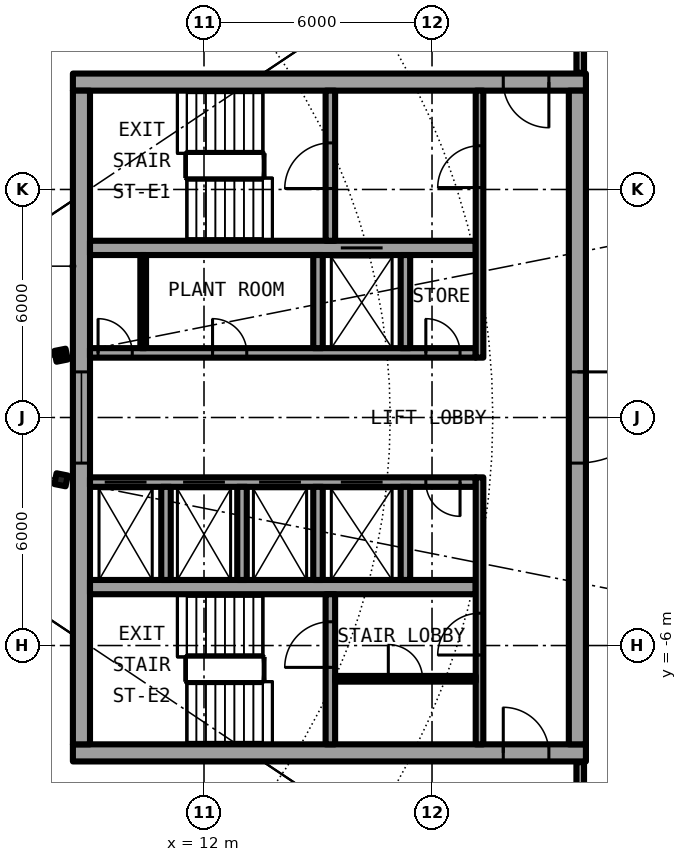
"""IFC4 building model, lengths in metres.
Left out: names, types, materials, properties, quantities, classifications, styles, units other than length and angle.
Written with IfcOpenShell. Run it as: python <this file> out.ifc"""

import sys

from ifc_helpers import new_model, si_unit, direction, frame, frame_2d, origin, origin_2d, place, context, subcontext, project, spatial, rectangle, i_section, extrude, element, fill, save


model = new_model("IFC4")
c1 = context("Model", 3, precision=1e-05, world=origin(), true_north=direction((0.0, 1.0)))
c2 = subcontext(c1, "Body", "Model", "MODEL_VIEW")
j1 = project(units=[si_unit("LENGTHUNIT", "METRE"), si_unit("PLANEANGLEUNIT", "RADIAN")], contexts=[c1])
p1 = place(None, origin())
s1 = spatial("IfcSite", under=j1, at=p1, CompositionType="ELEMENT")
p2 = place(p1, origin())
s2 = spatial("IfcBuilding", under=s1, at=p2, CompositionType="ELEMENT")
p3 = place(p2, frame((0.0, 0.0, 221.85)))
s3 = spatial("IfcBuildingStorey", under=s2, at=p3, CompositionType="ELEMENT", Elevation=221.85)
for number, where, z_axis, x_axis in (
    (1, (8.239, 1.639, 0.0), (0.0, 0.0, 1.0), (0.981, 0.195, 0.0)),
    (2, (8.239, -1.639, 0.0), (0.0, 0.0, 1.0), (0.981, -0.195, 0.0)),
):
    element("IfcColumn", number, at=place(p3, frame(where, z_axis=z_axis, x_axis=x_axis)), inside=s3, PredefinedType="COLUMN", context=c2, shape_type="SweptSolid", body=[
        extrude(i_section(OverallWidth=0.3, OverallDepth=0.29, WebThickness=0.009, FlangeThickness=0.014, FilletRadius=0.027, at=origin_2d()), origin(), (0.0, 0.0, 1.0), 6.1),
    ])
p4 = place(p3, frame((22.05, 8.825, 0.0), z_axis=(0.0, 0.0, 1.0), x_axis=(-1.0, 0.0, 0.0)))
e3 = element("IfcWall", 3, at=p4, inside=s3, PredefinedType="SHEAR", context=c2, shape_type="SweptSolid", body=[
    extrude(rectangle(XDim=13.5, YDim=0.45, at=frame_2d((6.75, 0.0))), origin(), (0.0, 0.0, 1.0), 6.1),
])
p5 = place(p4, frame((0.975, 0.0, 0.0)))
e4 = element("IfcOpeningElement", 4, at=p5, cuts=e3, PredefinedType="OPENING", context=c2, shape_type="SweptSolid", body=[
    extrude(rectangle(XDim=1.2, YDim=2.3, at=frame_2d((0.6, 1.15))), frame((0.0, 0.235, 0.0), z_axis=(0.0, -1.0, 0.0), x_axis=(1.0, 0.0, 0.0)), (0.0, 0.0, 1.0), 0.47),
])
p6 = place(p3, frame((8.55, -8.825, 0.0), z_axis=(0.0, 0.0, 1.0), x_axis=(1.0, 0.0, 0.0)))
e5 = element("IfcWall", 5, at=p6, inside=s3, PredefinedType="SHEAR", context=c2, shape_type="SweptSolid", body=[
    extrude(rectangle(XDim=13.5, YDim=0.45, at=frame_2d((6.75, 0.0))), origin(), (0.0, 0.0, 1.0), 6.1),
])
p7 = place(p6, frame((11.325, 0.0, 0.0)))
e6 = element("IfcOpeningElement", 6, at=p7, cuts=e5, PredefinedType="OPENING", context=c2, shape_type="SweptSolid", body=[
    extrude(rectangle(XDim=1.2, YDim=2.3, at=frame_2d((0.6, 1.15))), frame((0.0, 0.235, 0.0), z_axis=(0.0, -1.0, 0.0), x_axis=(1.0, 0.0, 0.0)), (0.0, 0.0, 1.0), 0.47),
])
p8 = place(p3, frame((21.825, 8.6, 0.0), z_axis=(0.0, 0.0, 1.0), x_axis=(0.0, -1.0, 0.0)))
e7 = element("IfcWall", 7, at=p8, inside=s3, PredefinedType="SHEAR", context=c2, shape_type="SweptSolid", body=[
    extrude(rectangle(XDim=17.2, YDim=0.45, at=frame_2d((8.6, 0.0))), origin(), (0.0, 0.0, 1.0), 6.1),
])
p9 = place(p8, frame((7.4, 0.0, 0.0)))
e8 = element("IfcOpeningElement", 8, at=p9, cuts=e7, PredefinedType="OPENING", context=c2, shape_type="SweptSolid", body=[
    extrude(rectangle(XDim=2.4, YDim=2.3, at=frame_2d((1.2, 1.15))), frame((0.0, 0.235, 0.0), z_axis=(0.0, -1.0, 0.0), x_axis=(1.0, 0.0, 0.0)), (0.0, 0.0, 1.0), 0.47),
])
p10 = place(p3, frame((8.775, -8.6, 0.0), z_axis=(0.0, 0.0, 1.0), x_axis=(0.0, 1.0, 0.0)))
e9 = element("IfcWall", 9, at=p10, inside=s3, PredefinedType="SHEAR", context=c2, shape_type="SweptSolid", body=[
    extrude(rectangle(XDim=17.2, YDim=0.45, at=frame_2d((8.6, 0.0))), origin(), (0.0, 0.0, 1.0), 6.1),
])
p11 = place(p10, frame((7.4, 0.0, 0.1)))
e10 = element("IfcOpeningElement", 10, at=p11, cuts=e9, PredefinedType="OPENING", context=c2, shape_type="SweptSolid", body=[
    extrude(rectangle(XDim=2.4, YDim=2.2, at=frame_2d((1.2, 1.1))), frame((0.0, 0.235, 0.0), z_axis=(0.0, -1.0, 0.0), x_axis=(1.0, 0.0, 0.0)), (0.0, 0.0, 1.0), 0.47),
])
p12 = place(p3, frame((9.0, 1.7, 0.0), z_axis=(0.0, 0.0, 1.0), x_axis=(1.0, 0.0, 0.0)))
e11 = element("IfcWall", 11, at=p12, inside=s3, PredefinedType="SHEAR", context=c2, shape_type="SweptSolid", body=[
    extrude(rectangle(XDim=10.15, YDim=0.25, at=frame_2d((5.075, 0.0))), origin(), (0.0, 0.0, 1.0), 6.1),
])
p13 = place(p12, frame((0.212, 0.0, 0.0)))
e12 = element("IfcOpeningElement", 12, at=p13, cuts=e11, PredefinedType="OPENING", context=c2, shape_type="SweptSolid", body=[
    extrude(rectangle(XDim=0.9, YDim=2.3, at=frame_2d((0.45, 1.15))), frame((0.0, 0.135, 0.0), z_axis=(0.0, -1.0, 0.0), x_axis=(1.0, 0.0, 0.0)), (0.0, 0.0, 1.0), 0.27),
])
p14 = place(p12, frame((3.225, 0.0, 0.0)))
e13 = element("IfcOpeningElement", 13, at=p14, cuts=e11, PredefinedType="OPENING", context=c2, shape_type="SweptSolid", body=[
    extrude(rectangle(XDim=0.9, YDim=2.3, at=frame_2d((0.45, 1.15))), frame((0.0, 0.135, 0.0), z_axis=(0.0, -1.0, 0.0), x_axis=(1.0, 0.0, 0.0)), (0.0, 0.0, 1.0), 0.27),
])
p15 = place(p12, frame((8.837, 0.0, 0.0)))
e14 = element("IfcOpeningElement", 14, at=p15, cuts=e11, PredefinedType="OPENING", context=c2, shape_type="SweptSolid", body=[
    extrude(rectangle(XDim=0.9, YDim=2.3, at=frame_2d((0.45, 1.15))), frame((0.0, 0.135, 0.0), z_axis=(0.0, -1.0, 0.0), x_axis=(1.0, 0.0, 0.0)), (0.0, 0.0, 1.0), 0.27),
])
p16 = place(p3, frame((9.0, 4.462, 0.0), z_axis=(0.0, 0.0, 1.0), x_axis=(1.0, 0.0, 0.0)))
e15 = element("IfcWall", 15, at=p16, inside=s3, PredefinedType="SHEAR", context=c2, shape_type="SweptSolid", body=[
    extrude(rectangle(XDim=10.15, YDim=0.375, at=frame_2d((5.075, 0.0))), origin(), (0.0, 0.0, 1.0), 6.1),
])
p17 = place(p16, frame((6.6, 0.0, 0.0)))
e16 = element("IfcOpeningElement", 16, at=p17, cuts=e15, PredefinedType="OPENING", context=c2, shape_type="SweptSolid", body=[
    extrude(rectangle(XDim=1.1, YDim=2.3, at=frame_2d((0.55, 1.15))), frame((0.0, 0.198, 0.0), z_axis=(0.0, -1.0, 0.0), x_axis=(1.0, 0.0, 0.0)), (0.0, 0.0, 1.0), 0.395),
])
p18 = place(p3, frame((15.325, 4.65, 0.0), z_axis=(0.0, 0.0, 1.0), x_axis=(0.0, 1.0, 0.0)))
e17 = element("IfcWall", 17, at=p18, inside=s3, PredefinedType="SHEAR", context=c2, shape_type="SweptSolid", body=[
    extrude(rectangle(XDim=3.95, YDim=0.25, at=frame_2d((1.975, 0.0))), origin(), (0.0, 0.0, 1.0), 6.1),
])
p19 = place(p18, frame((1.375, 0.0, 0.0)))
e18 = element("IfcOpeningElement", 18, at=p19, cuts=e17, PredefinedType="OPENING", context=c2, shape_type="SweptSolid", body=[
    extrude(rectangle(XDim=1.2, YDim=2.3, at=frame_2d((0.6, 1.15))), frame((0.0, 0.135, 0.0), z_axis=(0.0, -1.0, 0.0), x_axis=(1.0, 0.0, 0.0)), (0.0, 0.0, 1.0), 0.27),
])
for number, where, z_axis, x_axis in (
    (19, (15.0, 1.825, 0.0), (0.0, 0.0, 1.0), (0.0, 1.0, 0.0)),
    (20, (17.3, 1.825, 0.0), (0.0, 0.0, 1.0), (0.0, 1.0, 0.0)),
):
    element("IfcWall", number, at=place(p3, frame(where, z_axis=z_axis, x_axis=x_axis)), inside=s3, PredefinedType="SOLIDWALL", context=c2, shape_type="SweptSolid", body=[
        extrude(rectangle(XDim=2.45, YDim=0.25, at=frame_2d((1.225, 0.0))), origin(), (0.0, 0.0, 1.0), 5.75),
    ])
p20 = place(p3, frame((19.25, 1.575, 0.0), z_axis=(0.0, 0.0, 1.0), x_axis=(0.0, 1.0, 0.0)))
e21 = element("IfcWall", 21, at=p20, inside=s3, PredefinedType="SOLIDWALL", context=c2, shape_type="SweptSolid", body=[
    extrude(rectangle(XDim=7.025, YDim=0.2, at=frame_2d((3.513, 0.0))), origin(), (0.0, 0.0, 1.0), 5.75),
])
p21 = place(p20, frame((4.475, 0.0, 0.0)))
e22 = element("IfcOpeningElement", 22, at=p21, cuts=e21, PredefinedType="OPENING", context=c2, shape_type="SweptSolid", body=[
    extrude(rectangle(XDim=1.1, YDim=2.3, at=frame_2d((0.55, 1.15))), frame((0.0, 0.11, 0.0), z_axis=(0.0, -1.0, 0.0), x_axis=(1.0, 0.0, 0.0)), (0.0, 0.0, 1.0), 0.22),
])
p22 = place(p3, frame((19.15, -1.7, 0.0), z_axis=(0.0, 0.0, 1.0), x_axis=(-1.0, 0.0, 0.0)))
e23 = element("IfcWall", 23, at=p22, inside=s3, PredefinedType="SHEAR", context=c2, shape_type="SweptSolid", body=[
    extrude(rectangle(XDim=10.15, YDim=0.25, at=frame_2d((5.075, 0.0))), origin(), (0.0, 0.0, 1.0), 6.1),
])
p23 = place(p22, frame((8.663, 0.0, 0.0)))
e24 = element("IfcOpeningElement", 24, at=p23, cuts=e23, PredefinedType="OPENING", context=c2, shape_type="SweptSolid", body=[
    extrude(rectangle(XDim=1.1, YDim=2.3, at=frame_2d((0.55, 1.15))), frame((0.0, 0.135, 0.0), z_axis=(0.0, -1.0, 0.0), x_axis=(1.0, 0.0, 0.0)), (0.0, 0.0, 1.0), 0.27),
])
p24 = place(p22, frame((6.6, 0.0, 0.0)))
e25 = element("IfcOpeningElement", 25, at=p24, cuts=e23, PredefinedType="OPENING", context=c2, shape_type="SweptSolid", body=[
    extrude(rectangle(XDim=1.1, YDim=2.3, at=frame_2d((0.55, 1.15))), frame((0.0, 0.135, 0.0), z_axis=(0.0, -1.0, 0.0), x_axis=(1.0, 0.0, 0.0)), (0.0, 0.0, 1.0), 0.27),
])
p25 = place(p22, frame((4.6, 0.0, 0.0)))
e26 = element("IfcOpeningElement", 26, at=p25, cuts=e23, PredefinedType="OPENING", context=c2, shape_type="SweptSolid", body=[
    extrude(rectangle(XDim=1.1, YDim=2.3, at=frame_2d((0.55, 1.15))), frame((0.0, 0.135, 0.0), z_axis=(0.0, -1.0, 0.0), x_axis=(1.0, 0.0, 0.0)), (0.0, 0.0, 1.0), 0.27),
])
p26 = place(p22, frame((2.45, 0.0, 0.0)))
e27 = element("IfcOpeningElement", 27, at=p26, cuts=e23, PredefinedType="OPENING", context=c2, shape_type="SweptSolid", body=[
    extrude(rectangle(XDim=1.1, YDim=2.3, at=frame_2d((0.55, 1.15))), frame((0.0, 0.135, 0.0), z_axis=(0.0, -1.0, 0.0), x_axis=(1.0, 0.0, 0.0)), (0.0, 0.0, 1.0), 0.27),
])
p27 = place(p22, frame((0.413, 0.0, 0.0)))
e28 = element("IfcOpeningElement", 28, at=p27, cuts=e23, PredefinedType="OPENING", context=c2, shape_type="SweptSolid", body=[
    extrude(rectangle(XDim=0.9, YDim=2.3, at=frame_2d((0.45, 1.15))), frame((0.0, 0.135, 0.0), z_axis=(0.0, -1.0, 0.0), x_axis=(1.0, 0.0, 0.0)), (0.0, 0.0, 1.0), 0.27),
])
p28 = place(p3, frame((9.0, -4.462, 0.0), z_axis=(0.0, 0.0, 1.0), x_axis=(1.0, 0.0, 0.0)))
e29 = element("IfcWall", 29, at=p28, inside=s3, PredefinedType="SHEAR", context=c2, shape_type="SweptSolid", body=[
    extrude(rectangle(XDim=10.15, YDim=0.375, at=frame_2d((5.075, 0.0))), origin(), (0.0, 0.0, 1.0), 6.1),
])
p29 = place(p3, frame((15.325, -8.6, 0.0), z_axis=(0.0, 0.0, 1.0), x_axis=(0.0, 1.0, 0.0)))
e30 = element("IfcWall", 30, at=p29, inside=s3, PredefinedType="SHEAR", context=c2, shape_type="SweptSolid", body=[
    extrude(rectangle(XDim=3.95, YDim=0.25, at=frame_2d((1.975, 0.0))), origin(), (0.0, 0.0, 1.0), 6.1),
])
p30 = place(p29, frame((2.025, 0.0, 0.0)))
e31 = element("IfcOpeningElement", 31, at=p30, cuts=e30, PredefinedType="OPENING", context=c2, shape_type="SweptSolid", body=[
    extrude(rectangle(XDim=1.2, YDim=2.3, at=frame_2d((0.6, 1.15))), frame((0.0, 0.135, 0.0), z_axis=(0.0, -1.0, 0.0), x_axis=(1.0, 0.0, 0.0)), (0.0, 0.0, 1.0), 0.27),
])
for number, where, z_axis, x_axis in (
    (32, (15.0, -1.825, 0.0), (0.0, 0.0, 1.0), (0.0, -1.0, 0.0)),
    (33, (17.3, -1.825, 0.0), (0.0, 0.0, 1.0), (0.0, -1.0, 0.0)),
):
    element("IfcWall", number, at=place(p3, frame(where, z_axis=z_axis, x_axis=x_axis)), inside=s3, PredefinedType="SOLIDWALL", context=c2, shape_type="SweptSolid", body=[
        extrude(rectangle(XDim=2.45, YDim=0.25, at=frame_2d((1.225, 0.0))), origin(), (0.0, 0.0, 1.0), 5.75),
    ])
p31 = place(p3, frame((19.25, -8.6, 0.0), z_axis=(0.0, 0.0, 1.0), x_axis=(0.0, 1.0, 0.0)))
e34 = element("IfcWall", 34, at=p31, inside=s3, PredefinedType="SOLIDWALL", context=c2, shape_type="SweptSolid", body=[
    extrude(rectangle(XDim=7.025, YDim=0.2, at=frame_2d((3.513, 0.0))), origin(), (0.0, 0.0, 1.0), 5.75),
])
p32 = place(p31, frame((2.35, 0.0, 0.0)))
e35 = element("IfcOpeningElement", 35, at=p32, cuts=e34, PredefinedType="OPENING", context=c2, shape_type="SweptSolid", body=[
    extrude(rectangle(XDim=1.1, YDim=2.3, at=frame_2d((0.55, 1.15))), frame((0.0, 0.11, 0.0), z_axis=(0.0, -1.0, 0.0), x_axis=(1.0, 0.0, 0.0)), (0.0, 0.0, 1.0), 0.22),
])
for number, where, z_axis, x_axis in (
    (36, (11.0, -1.825, 0.0), (0.0, 0.0, 1.0), (0.0, -1.0, 0.0)),
    (37, (13.0, -1.825, 0.0), (0.0, 0.0, 1.0), (0.0, -1.0, 0.0)),
):
    element("IfcWall", number, at=place(p3, frame(where, z_axis=z_axis, x_axis=x_axis)), inside=s3, PredefinedType="SOLIDWALL", context=c2, shape_type="SweptSolid", body=[
        extrude(rectangle(XDim=2.45, YDim=0.25, at=frame_2d((1.225, 0.0))), origin(), (0.0, 0.0, 1.0), 5.75),
    ])
p33 = place(p3, frame((10.4, 1.825, 0.0), z_axis=(0.0, 0.0, 1.0), x_axis=(0.0, 1.0, 0.0)))
e38 = element("IfcWall", 38, at=p33, inside=s3, PredefinedType="PARTITIONING", context=c2, shape_type="SweptSolid", body=[
    extrude(rectangle(XDim=2.45, YDim=0.15, at=frame_2d((1.225, 0.0))), origin(), (0.0, 0.0, 1.0), 5.75),
])
p34 = place(p3, frame((15.45, -6.875, 0.0), z_axis=(0.0, 0.0, 1.0), x_axis=(1.0, 0.0, 0.0)))
e39 = element("IfcWall", 39, at=p34, inside=s3, PredefinedType="PARTITIONING", context=c2, shape_type="SweptSolid", body=[
    extrude(rectangle(XDim=3.7, YDim=0.15, at=frame_2d((1.85, 0.0))), origin(), (0.0, 0.0, 1.0), 5.75),
])
p35 = place(p34, frame((1.4, 0.0, 0.0)))
e40 = element("IfcOpeningElement", 40, at=p35, cuts=e39, PredefinedType="OPENING", context=c2, shape_type="SweptSolid", body=[
    extrude(rectangle(XDim=0.9, YDim=2.3, at=frame_2d((0.45, 1.15))), frame((0.0, 0.085, 0.0), z_axis=(0.0, -1.0, 0.0), x_axis=(1.0, 0.0, 0.0)), (0.0, 0.0, 1.0), 0.17),
])
for number, where, z_axis, x_axis in (
    (41, (21.9, -12.47, 0.0), (0.0, 0.0, 1.0), (0.0, 1.0, 0.0)),
    (42, (21.9, 9.07, 0.0), (0.0, 0.0, 1.0), (0.0, 1.0, 0.0)),
):
    element("IfcWall", number, at=place(p3, frame(where, z_axis=z_axis, x_axis=x_axis)), inside=s3, PredefinedType="PARTITIONING", context=c2, shape_type="SweptSolid", body=[
        extrude(rectangle(XDim=3.4, YDim=0.2, at=frame_2d((1.7, 0.0))), origin(), (0.0, 0.0, 1.0), 5.75),
    ])
p36 = place(p3, frame((3.758, -9.072, 0.0), z_axis=(0.0, 0.0, 1.0), x_axis=(0.382637007118, -0.923898761112, 0.0)))
e43 = element("IfcWall", 43, at=p36, inside=s3, PredefinedType="PARTITIONING", context=c2, shape_type="SweptSolid", body=[
    extrude(rectangle(XDim=17.489, YDim=0.15, at=frame_2d((8.744, 0.0))), origin(), (0.0, 0.0, 1.0), 5.75),
])
p37 = place(p17, origin())
e44 = element("IfcDoor", 44, at=p37, inside=s3, OperationType="DOUBLE_DOOR_SLIDING", PredefinedType="DOOR", context=c2, shape_type="SweptSolid", body=[
    extrude(rectangle(XDim=1.1, YDim=2.3, at=frame_2d((0.55, 1.15))), frame((0.0, 0.025, 0.0), z_axis=(0.0, -1.0, 0.0), x_axis=(1.0, 0.0, 0.0)), (0.0, 0.0, 1.0), 0.05),
])
fill(e16, e44)
p38 = place(p23, origin())
e45 = element("IfcDoor", 45, at=p38, inside=s3, OperationType="DOUBLE_DOOR_SLIDING", PredefinedType="DOOR", context=c2, shape_type="SweptSolid", body=[
    extrude(rectangle(XDim=1.1, YDim=2.3, at=frame_2d((0.55, 1.15))), frame((0.0, 0.025, 0.0), z_axis=(0.0, -1.0, 0.0), x_axis=(1.0, 0.0, 0.0)), (0.0, 0.0, 1.0), 0.05),
])
fill(e24, e45)
p39 = place(p24, origin())
e46 = element("IfcDoor", 46, at=p39, inside=s3, OperationType="DOUBLE_DOOR_SLIDING", PredefinedType="DOOR", context=c2, shape_type="SweptSolid", body=[
    extrude(rectangle(XDim=1.1, YDim=2.3, at=frame_2d((0.55, 1.15))), frame((0.0, 0.025, 0.0), z_axis=(0.0, -1.0, 0.0), x_axis=(1.0, 0.0, 0.0)), (0.0, 0.0, 1.0), 0.05),
])
fill(e25, e46)
p40 = place(p25, origin())
e47 = element("IfcDoor", 47, at=p40, inside=s3, OperationType="DOUBLE_DOOR_SLIDING", PredefinedType="DOOR", context=c2, shape_type="SweptSolid", body=[
    extrude(rectangle(XDim=1.1, YDim=2.3, at=frame_2d((0.55, 1.15))), frame((0.0, 0.025, 0.0), z_axis=(0.0, -1.0, 0.0), x_axis=(1.0, 0.0, 0.0)), (0.0, 0.0, 1.0), 0.05),
])
fill(e26, e47)
p41 = place(p26, origin())
e48 = element("IfcDoor", 48, at=p41, inside=s3, OperationType="DOUBLE_DOOR_SLIDING", PredefinedType="DOOR", context=c2, shape_type="SweptSolid", body=[
    extrude(rectangle(XDim=1.1, YDim=2.3, at=frame_2d((0.55, 1.15))), frame((0.0, 0.025, 0.0), z_axis=(0.0, -1.0, 0.0), x_axis=(1.0, 0.0, 0.0)), (0.0, 0.0, 1.0), 0.05),
])
fill(e27, e48)
p42 = place(p13, origin())
e49 = element("IfcDoor", 49, at=p42, inside=s3, OperationType="SINGLE_SWING_RIGHT", PredefinedType="DOOR", context=c2, shape_type="SweptSolid", body=[
    extrude(rectangle(XDim=0.9, YDim=2.3, at=frame_2d((0.45, 1.15))), frame((0.0, 0.025, 0.0), z_axis=(0.0, -1.0, 0.0), x_axis=(1.0, 0.0, 0.0)), (0.0, 0.0, 1.0), 0.05),
])
fill(e12, e49)
p43 = place(p14, origin())
e50 = element("IfcDoor", 50, at=p43, inside=s3, OperationType="SINGLE_SWING_RIGHT", PredefinedType="DOOR", context=c2, shape_type="SweptSolid", body=[
    extrude(rectangle(XDim=0.9, YDim=2.3, at=frame_2d((0.45, 1.15))), frame((0.0, 0.025, 0.0), z_axis=(0.0, -1.0, 0.0), x_axis=(1.0, 0.0, 0.0)), (0.0, 0.0, 1.0), 0.05),
])
fill(e13, e50)
p44 = place(p15, origin())
e51 = element("IfcDoor", 51, at=p44, inside=s3, OperationType="SINGLE_SWING_LEFT", PredefinedType="DOOR", context=c2, shape_type="SweptSolid", body=[
    extrude(rectangle(XDim=0.9, YDim=2.3, at=frame_2d((0.45, 1.15))), frame((0.0, 0.025, 0.0), z_axis=(0.0, -1.0, 0.0), x_axis=(1.0, 0.0, 0.0)), (0.0, 0.0, 1.0), 0.05),
])
fill(e14, e51)
p45 = place(p27, origin())
e52 = element("IfcDoor", 52, at=p45, inside=s3, OperationType="SINGLE_SWING_RIGHT", PredefinedType="DOOR", context=c2, shape_type="SweptSolid", body=[
    extrude(rectangle(XDim=0.9, YDim=2.3, at=frame_2d((0.45, 1.15))), frame((0.0, 0.025, 0.0), z_axis=(0.0, -1.0, 0.0), x_axis=(1.0, 0.0, 0.0)), (0.0, 0.0, 1.0), 0.05),
])
fill(e28, e52)
p46 = place(p35, origin())
e53 = element("IfcDoor", 53, at=p46, inside=s3, OperationType="SINGLE_SWING_LEFT", PredefinedType="DOOR", context=c2, shape_type="SweptSolid", body=[
    extrude(rectangle(XDim=0.9, YDim=2.3, at=frame_2d((0.45, 1.15))), frame((0.0, 0.025, 0.0), z_axis=(0.0, -1.0, 0.0), x_axis=(1.0, 0.0, 0.0)), (0.0, 0.0, 1.0), 0.05),
])
fill(e40, e53)
p47 = place(p19, origin())
e54 = element("IfcDoor", 54, at=p47, inside=s3, OperationType="SINGLE_SWING_LEFT", PredefinedType="DOOR", context=c2, shape_type="SweptSolid", body=[
    extrude(rectangle(XDim=1.2, YDim=2.3, at=frame_2d((0.6, 1.15))), frame((0.0, 0.025, 0.0), z_axis=(0.0, -1.0, 0.0), x_axis=(1.0, 0.0, 0.0)), (0.0, 0.0, 1.0), 0.05),
])
fill(e18, e54)
p48 = place(p30, origin())
e55 = element("IfcDoor", 55, at=p48, inside=s3, OperationType="SINGLE_SWING_LEFT", PredefinedType="DOOR", context=c2, shape_type="SweptSolid", body=[
    extrude(rectangle(XDim=1.2, YDim=2.3, at=frame_2d((0.6, 1.15))), frame((0.0, 0.025, 0.0), z_axis=(0.0, -1.0, 0.0), x_axis=(1.0, 0.0, 0.0)), (0.0, 0.0, 1.0), 0.05),
])
fill(e31, e55)
p49 = place(p21, origin())
e56 = element("IfcDoor", 56, at=p49, inside=s3, OperationType="SINGLE_SWING_LEFT", PredefinedType="DOOR", context=c2, shape_type="SweptSolid", body=[
    extrude(rectangle(XDim=1.1, YDim=2.3, at=frame_2d((0.55, 1.15))), frame((0.0, 0.025, 0.0), z_axis=(0.0, -1.0, 0.0), x_axis=(1.0, 0.0, 0.0)), (0.0, 0.0, 1.0), 0.05),
])
fill(e22, e56)
p50 = place(p32, origin())
e57 = element("IfcDoor", 57, at=p50, inside=s3, OperationType="SINGLE_SWING_RIGHT", PredefinedType="DOOR", context=c2, shape_type="SweptSolid", body=[
    extrude(rectangle(XDim=1.1, YDim=2.3, at=frame_2d((0.55, 1.15))), frame((0.0, 0.025, 0.0), z_axis=(0.0, -1.0, 0.0), x_axis=(1.0, 0.0, 0.0)), (0.0, 0.0, 1.0), 0.05),
])
fill(e35, e57)
p51 = place(p5, origin())
e58 = element("IfcDoor", 58, at=p51, inside=s3, OperationType="SINGLE_SWING_RIGHT", PredefinedType="DOOR", context=c2, shape_type="SweptSolid", body=[
    extrude(rectangle(XDim=1.2, YDim=2.3, at=frame_2d((0.6, 1.15))), frame((0.0, 0.025, 0.0), z_axis=(0.0, -1.0, 0.0), x_axis=(1.0, 0.0, 0.0)), (0.0, 0.0, 1.0), 0.05),
])
fill(e4, e58)
p52 = place(p7, origin())
e59 = element("IfcDoor", 59, at=p52, inside=s3, OperationType="SINGLE_SWING_LEFT", PredefinedType="DOOR", context=c2, shape_type="SweptSolid", body=[
    extrude(rectangle(XDim=1.2, YDim=2.3, at=frame_2d((0.6, 1.15))), frame((0.0, 0.025, 0.0), z_axis=(0.0, -1.0, 0.0), x_axis=(1.0, 0.0, 0.0)), (0.0, 0.0, 1.0), 0.05),
])
fill(e6, e59)
p53 = place(p9, origin())
e60 = element("IfcDoor", 60, at=p53, inside=s3, OperationType="SINGLE_SWING_LEFT", PredefinedType="DOOR", context=c2, shape_type="SweptSolid", body=[
    extrude(rectangle(XDim=2.4, YDim=2.3, at=frame_2d((1.2, 1.15))), frame((0.0, 0.025, 0.0), z_axis=(0.0, -1.0, 0.0), x_axis=(1.0, 0.0, 0.0)), (0.0, 0.0, 1.0), 0.05),
])
fill(e8, e60)
p54 = place(p11, origin())
e61 = element("IfcWindow", 61, at=p54, inside=s3, PartitioningType="SINGLE_PANEL", PredefinedType="WINDOW", context=c2, shape_type="SweptSolid", body=[
    extrude(rectangle(XDim=2.4, YDim=2.2, at=frame_2d((1.2, 1.1))), frame((0.0, 0.03, 0.0), z_axis=(0.0, -1.0, 0.0), x_axis=(1.0, 0.0, 0.0)), (0.0, 0.0, 1.0), 0.06),
])
fill(e10, e61)
save(model, sys.argv[1])
